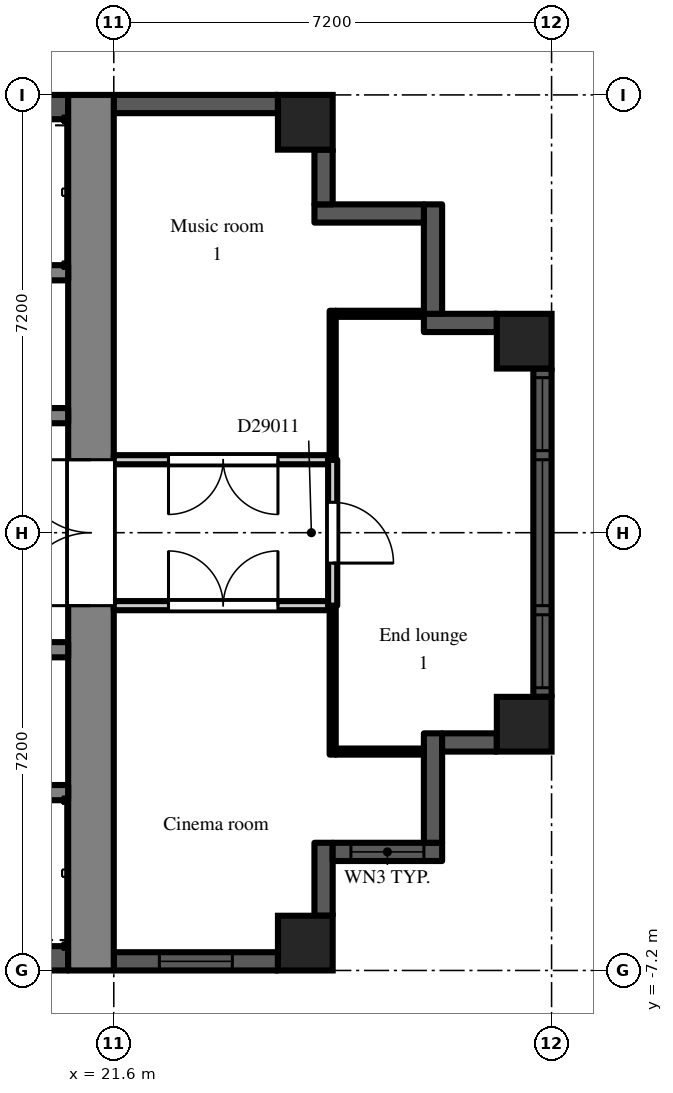
"""IFC4 building model, lengths in metres.
Left out: names, types, materials, properties, quantities, classifications, styles, units other than length and angle.
Written with IfcOpenShell. Run it as: python <this file> out.ifc"""

import sys

from ifc_helpers import new_model, si_unit, direction, frame, frame_2d, origin, origin_2d, place, context, subcontext, project, spatial, rectangle, extrude, element, fill, save


model = new_model("IFC4")
c1 = context("Model", 3, precision=1e-05, world=origin(), true_north=direction((0.0, 1.0)))
c2 = subcontext(c1, "Body", "Model", "MODEL_VIEW")
j1 = project(units=[si_unit("LENGTHUNIT", "METRE"), si_unit("PLANEANGLEUNIT", "RADIAN")], contexts=[c1])
p1 = place(None, origin())
s1 = spatial("IfcSite", under=j1, at=p1, CompositionType="ELEMENT")
p2 = place(p1, origin())
s2 = spatial("IfcBuilding", under=s1, at=p2, CompositionType="ELEMENT")
p3 = place(p2, frame((0.0, 0.0, 198.9)))
s3 = spatial("IfcBuildingStorey", under=s2, at=p3, CompositionType="ELEMENT", Elevation=198.9)
for number, where, z_axis, x_axis in (
    (1, (24.75, -6.75, 0.0), (0.0, 0.0, 1.0), (1.0, 0.0, 0.0)),
    (2, (24.75, 6.75, 0.0), (0.0, 0.0, 1.0), (1.0, 0.0, 0.0)),
    (3, (28.35, -3.15, 0.0), (0.0, 0.0, 1.0), (1.0, 0.0, 0.0)),
    (4, (28.35, 3.15, 0.0), (0.0, 0.0, 1.0), (1.0, 0.0, 0.0)),
):
    element("IfcColumn", number, at=place(p3, frame(where, z_axis=z_axis, x_axis=x_axis)), inside=s3, PredefinedType="COLUMN", context=c2, shape_type="SweptSolid", body=[
        extrude(rectangle(XDim=0.9, YDim=0.9, at=origin_2d()), origin(), (0.0, 0.0, 1.0), 3.0),
    ])
p4 = place(p3, frame((21.6, -7.05, 0.0), z_axis=(0.0, 0.0, 1.0), x_axis=(1.0, 0.0, 0.0)))
e5 = element("IfcWall", 5, at=p4, inside=s3, PredefinedType="SOLIDWALL", context=c2, shape_type="SweptSolid", body=[
    extrude(rectangle(XDim=2.7, YDim=0.3, at=frame_2d((1.35, 0.0))), origin(), (0.0, 0.0, 1.0), 2.3),
])
p5 = place(p4, frame((0.75, 0.0, 0.2)))
e6 = element("IfcOpeningElement", 6, at=p5, cuts=e5, PredefinedType="OPENING", context=c2, shape_type="SweptSolid", body=[
    extrude(rectangle(XDim=1.2, YDim=1.85, at=frame_2d((0.6, 0.925))), frame((0.0, 0.16, 0.0), z_axis=(0.0, -1.0, 0.0), x_axis=(1.0, 0.0, 0.0)), (0.0, 0.0, 1.0), 0.32),
])
p6 = place(p3, frame((25.05, -6.3, 0.0), z_axis=(0.0, 0.0, 1.0), x_axis=(0.0, 1.0, 0.0)))
e7 = element("IfcWall", 7, at=p6, inside=s3, PredefinedType="SOLIDWALL", context=c2, shape_type="SweptSolid", body=[
    extrude(rectangle(XDim=1.2, YDim=0.3, at=frame_2d((0.6, 0.0))), origin(), (0.0, 0.0, 1.0), 2.6),
])
p7 = place(p3, frame((25.2, -5.25, 0.0), z_axis=(0.0, 0.0, 1.0), x_axis=(1.0, 0.0, 0.0)))
e8 = element("IfcWall", 8, at=p7, inside=s3, PredefinedType="SOLIDWALL", context=c2, shape_type="SweptSolid", body=[
    extrude(rectangle(XDim=1.8, YDim=0.3, at=frame_2d((0.9, 0.0))), origin(), (0.0, 0.0, 1.0), 2.6),
])
p8 = place(p7, frame((0.3, 0.0, 0.2)))
e9 = element("IfcOpeningElement", 9, at=p8, cuts=e8, PredefinedType="OPENING", context=c2, shape_type="SweptSolid", body=[
    extrude(rectangle(XDim=1.2, YDim=1.85, at=frame_2d((0.6, 0.925))), frame((0.0, 0.16, 0.0), z_axis=(0.0, -1.0, 0.0), x_axis=(1.0, 0.0, 0.0)), (0.0, 0.0, 1.0), 0.32),
])
p9 = place(p3, frame((26.85, -5.1, 0.0), z_axis=(0.0, 0.0, 1.0), x_axis=(0.0, 1.0, 0.0)))
e10 = element("IfcWall", 10, at=p9, inside=s3, PredefinedType="SOLIDWALL", context=c2, shape_type="SweptSolid", body=[
    extrude(rectangle(XDim=1.8, YDim=0.3, at=frame_2d((0.9, 0.0))), origin(), (0.0, 0.0, 1.0), 2.6),
])
p10 = place(p3, frame((27.0, -3.45, 0.0), z_axis=(0.0, 0.0, 1.0), x_axis=(1.0, 0.0, 0.0)))
e11 = element("IfcWall", 11, at=p10, inside=s3, PredefinedType="SOLIDWALL", context=c2, shape_type="SweptSolid", body=[
    extrude(rectangle(XDim=0.9, YDim=0.3, at=frame_2d((0.45, 0.0))), origin(), (0.0, 0.0, 1.0), 2.6),
])
p11 = place(p3, frame((28.65, -2.7, 0.0), z_axis=(0.0, 0.0, 1.0), x_axis=(0.0, 1.0, 0.0)))
e12 = element("IfcWall", 12, at=p11, inside=s3, PredefinedType="SOLIDWALL", context=c2, shape_type="SweptSolid", body=[
    extrude(rectangle(XDim=5.4, YDim=0.3, at=frame_2d((2.7, 0.0))), origin(), (0.0, 0.0, 1.0), 2.3),
])
p12 = place(p11, frame((1.5, 0.0, 0.2)))
e13 = element("IfcOpeningElement", 13, at=p12, cuts=e12, PredefinedType="OPENING", context=c2, shape_type="SweptSolid", body=[
    extrude(rectangle(XDim=2.4, YDim=1.85, at=frame_2d((1.2, 0.925))), frame((0.0, 0.16, 0.0), z_axis=(0.0, -1.0, 0.0), x_axis=(1.0, 0.0, 0.0)), (0.0, 0.0, 1.0), 0.32),
])
p13 = place(p11, frame((0.15, 0.0, 0.2)))
e14 = element("IfcOpeningElement", 14, at=p13, cuts=e12, PredefinedType="OPENING", context=c2, shape_type="SweptSolid", body=[
    extrude(rectangle(XDim=1.2, YDim=1.85, at=frame_2d((0.6, 0.925))), frame((0.0, 0.16, 0.0), z_axis=(0.0, -1.0, 0.0), x_axis=(1.0, 0.0, 0.0)), (0.0, 0.0, 1.0), 0.32),
])
p14 = place(p11, frame((4.05, 0.0, 0.2)))
e15 = element("IfcOpeningElement", 15, at=p14, cuts=e12, PredefinedType="OPENING", context=c2, shape_type="SweptSolid", body=[
    extrude(rectangle(XDim=1.2, YDim=1.85, at=frame_2d((0.6, 0.925))), frame((0.0, 0.16, 0.0), z_axis=(0.0, -1.0, 0.0), x_axis=(1.0, 0.0, 0.0)), (0.0, 0.0, 1.0), 0.32),
])
p15 = place(p3, frame((27.9, 3.45, 0.0), z_axis=(0.0, 0.0, 1.0), x_axis=(-1.0, 0.0, 0.0)))
e16 = element("IfcWall", 16, at=p15, inside=s3, PredefinedType="SOLIDWALL", context=c2, shape_type="SweptSolid", body=[
    extrude(rectangle(XDim=1.2, YDim=0.3, at=frame_2d((0.6, 0.0))), origin(), (0.0, 0.0, 1.0), 2.6),
])
p16 = place(p3, frame((26.85, 3.6, 0.0), z_axis=(0.0, 0.0, 1.0), x_axis=(0.0, 1.0, 0.0)))
e17 = element("IfcWall", 17, at=p16, inside=s3, PredefinedType="SOLIDWALL", context=c2, shape_type="SweptSolid", body=[
    extrude(rectangle(XDim=1.8, YDim=0.3, at=frame_2d((0.9, 0.0))), origin(), (0.0, 0.0, 1.0), 2.6),
])
p17 = place(p3, frame((26.7, 5.25, 0.0), z_axis=(0.0, 0.0, 1.0), x_axis=(-1.0, 0.0, 0.0)))
e18 = element("IfcWall", 18, at=p17, inside=s3, PredefinedType="SOLIDWALL", context=c2, shape_type="SweptSolid", body=[
    extrude(rectangle(XDim=1.8, YDim=0.3, at=frame_2d((0.9, 0.0))), origin(), (0.0, 0.0, 1.0), 2.6),
])
p18 = place(p3, frame((25.05, 5.4, 0.0), z_axis=(0.0, 0.0, 1.0), x_axis=(0.0, 1.0, 0.0)))
e19 = element("IfcWall", 19, at=p18, inside=s3, PredefinedType="SOLIDWALL", context=c2, shape_type="SweptSolid", body=[
    extrude(rectangle(XDim=0.9, YDim=0.3, at=frame_2d((0.45, 0.0))), origin(), (0.0, 0.0, 1.0), 2.6),
])
p19 = place(p3, frame((24.3, 7.05, 0.0), z_axis=(0.0, 0.0, 1.0), x_axis=(-1.0, 0.0, 0.0)))
e20 = element("IfcWall", 20, at=p19, inside=s3, PredefinedType="SOLIDWALL", context=c2, shape_type="SweptSolid", body=[
    extrude(rectangle(XDim=2.7, YDim=0.3, at=frame_2d((1.35, 0.0))), origin(), (0.0, 0.0, 1.0), 2.3),
])
p20 = place(p3, frame((21.225, -7.2, 0.0), z_axis=(0.0, 0.0, 1.0), x_axis=(0.0, 1.0, 0.0)))
e21 = element("IfcWall", 21, at=p20, inside=s3, PredefinedType="SHEAR", context=c2, shape_type="SweptSolid", body=[
    extrude(rectangle(XDim=14.4, YDim=0.75, at=frame_2d((7.2, 0.0))), origin(), (0.0, 0.0, 1.0), 2.6),
])
p21 = place(p20, frame((6.0, 0.0, 0.0)))
e22 = element("IfcOpeningElement", 22, at=p21, cuts=e21, PredefinedType="OPENING", context=c2, shape_type="SweptSolid", body=[
    extrude(rectangle(XDim=2.4, YDim=2.2, at=frame_2d((1.2, 1.1))), frame((0.0, 0.385, 0.0), z_axis=(0.0, -1.0, 0.0), x_axis=(1.0, 0.0, 0.0)), (0.0, 0.0, 1.0), 0.77),
])
p22 = place(p3, frame((7.9, 7.0, 0.0), z_axis=(0.0, 0.0, 1.0), x_axis=(1.0, 0.0, 0.0)))
e23 = element("IfcWall", 23, at=p22, inside=s3, PredefinedType="SHEAR", context=c2, shape_type="SweptSolid", body=[
    extrude(rectangle(XDim=12.95, YDim=0.4, at=frame_2d((6.475, 0.0))), origin(), (0.0, 0.0, 1.0), 2.6),
])
p23 = place(p3, frame((7.9, 1.925, 0.0), z_axis=(0.0, 0.0, 1.0), x_axis=(1.0, 0.0, 0.0)))
e24 = element("IfcWall", 24, at=p23, inside=s3, PredefinedType="SHEAR", context=c2, shape_type="SweptSolid", body=[
    extrude(rectangle(XDim=12.95, YDim=0.25, at=frame_2d((6.475, 0.0))), origin(), (0.0, 0.0, 1.0), 2.6),
])
p24 = place(p23, frame((4.825, 0.0, 0.0)))
e25 = element("IfcOpeningElement", 25, at=p24, cuts=e24, PredefinedType="OPENING", context=c2, shape_type="SweptSolid", body=[
    extrude(rectangle(XDim=1.1, YDim=2.1, at=frame_2d((0.55, 1.05))), frame((0.0, 0.135, 0.0), z_axis=(0.0, -1.0, 0.0), x_axis=(1.0, 0.0, 0.0)), (0.0, 0.0, 1.0), 0.27),
])
p25 = place(p23, frame((7.025, 0.0, 0.0)))
e26 = element("IfcOpeningElement", 26, at=p25, cuts=e24, PredefinedType="OPENING", context=c2, shape_type="SweptSolid", body=[
    extrude(rectangle(XDim=1.1, YDim=2.1, at=frame_2d((0.55, 1.05))), frame((0.0, 0.135, 0.0), z_axis=(0.0, -1.0, 0.0), x_axis=(1.0, 0.0, 0.0)), (0.0, 0.0, 1.0), 0.27),
])
p26 = place(p23, frame((9.225, 0.0, 0.0)))
e27 = element("IfcOpeningElement", 27, at=p26, cuts=e24, PredefinedType="OPENING", context=c2, shape_type="SweptSolid", body=[
    extrude(rectangle(XDim=1.1, YDim=2.1, at=frame_2d((0.55, 1.05))), frame((0.0, 0.135, 0.0), z_axis=(0.0, -1.0, 0.0), x_axis=(1.0, 0.0, 0.0)), (0.0, 0.0, 1.0), 0.27),
])
p27 = place(p23, frame((0.525, 0.0, 0.0)))
e28 = element("IfcOpeningElement", 28, at=p27, cuts=e24, PredefinedType="OPENING", context=c2, shape_type="SweptSolid", body=[
    extrude(rectangle(XDim=0.9, YDim=2.1, at=frame_2d((0.45, 1.05))), frame((0.0, 0.135, 0.0), z_axis=(0.0, -1.0, 0.0), x_axis=(1.0, 0.0, 0.0)), (0.0, 0.0, 1.0), 0.27),
])
p28 = place(p23, frame((2.625, 0.0, 0.0)))
e29 = element("IfcOpeningElement", 29, at=p28, cuts=e24, PredefinedType="OPENING", context=c2, shape_type="SweptSolid", body=[
    extrude(rectangle(XDim=1.1, YDim=2.1, at=frame_2d((0.55, 1.05))), frame((0.0, 0.135, 0.0), z_axis=(0.0, -1.0, 0.0), x_axis=(1.0, 0.0, 0.0)), (0.0, 0.0, 1.0), 0.27),
])
p29 = place(p23, frame((11.525, 0.0, 0.0)))
e30 = element("IfcOpeningElement", 30, at=p29, cuts=e24, PredefinedType="OPENING", context=c2, shape_type="SweptSolid", body=[
    extrude(rectangle(XDim=0.9, YDim=2.1, at=frame_2d((0.45, 1.05))), frame((0.0, 0.135, 0.0), z_axis=(0.0, -1.0, 0.0), x_axis=(1.0, 0.0, 0.0)), (0.0, 0.0, 1.0), 0.27),
])
p30 = place(p3, frame((12.3, 4.275, 0.0), z_axis=(0.0, 0.0, 1.0), x_axis=(1.0, 0.0, 0.0)))
e31 = element("IfcWall", 31, at=p30, inside=s3, PredefinedType="SHEAR", context=c2, shape_type="SweptSolid", body=[
    extrude(rectangle(XDim=8.55, YDim=0.25, at=frame_2d((4.275, 0.0))), origin(), (0.0, 0.0, 1.0), 2.6),
])
p31 = place(p3, frame((7.9, -7.0, 0.0), z_axis=(0.0, 0.0, 1.0), x_axis=(1.0, 0.0, 0.0)))
e32 = element("IfcWall", 32, at=p31, inside=s3, PredefinedType="SHEAR", context=c2, shape_type="SweptSolid", body=[
    extrude(rectangle(XDim=12.95, YDim=0.4, at=frame_2d((6.475, 0.0))), origin(), (0.0, 0.0, 1.0), 2.6),
])
p32 = place(p3, frame((7.9, -1.925, 0.0), z_axis=(0.0, 0.0, 1.0), x_axis=(1.0, 0.0, 0.0)))
e33 = element("IfcWall", 33, at=p32, inside=s3, PredefinedType="SHEAR", context=c2, shape_type="SweptSolid", body=[
    extrude(rectangle(XDim=12.95, YDim=0.25, at=frame_2d((6.475, 0.0))), origin(), (0.0, 0.0, 1.0), 2.6),
])
p33 = place(p32, frame((0.525, 0.0, 0.0)))
e34 = element("IfcOpeningElement", 34, at=p33, cuts=e33, PredefinedType="OPENING", context=c2, shape_type="SweptSolid", body=[
    extrude(rectangle(XDim=0.9, YDim=2.1, at=frame_2d((0.45, 1.05))), frame((0.0, 0.135, 0.0), z_axis=(0.0, -1.0, 0.0), x_axis=(1.0, 0.0, 0.0)), (0.0, 0.0, 1.0), 0.27),
])
p34 = place(p32, frame((2.625, 0.0, 0.0)))
e35 = element("IfcOpeningElement", 35, at=p34, cuts=e33, PredefinedType="OPENING", context=c2, shape_type="SweptSolid", body=[
    extrude(rectangle(XDim=1.1, YDim=2.1, at=frame_2d((0.55, 1.05))), frame((0.0, 0.135, 0.0), z_axis=(0.0, -1.0, 0.0), x_axis=(1.0, 0.0, 0.0)), (0.0, 0.0, 1.0), 0.27),
])
p35 = place(p32, frame((6.025, 0.0, 0.0)))
e36 = element("IfcOpeningElement", 36, at=p35, cuts=e33, PredefinedType="OPENING", context=c2, shape_type="SweptSolid", body=[
    extrude(rectangle(XDim=0.9, YDim=2.1, at=frame_2d((0.45, 1.05))), frame((0.0, 0.135, 0.0), z_axis=(0.0, -1.0, 0.0), x_axis=(1.0, 0.0, 0.0)), (0.0, 0.0, 1.0), 0.27),
])
p36 = place(p32, frame((10.425, 0.0, 0.0)))
e37 = element("IfcOpeningElement", 37, at=p36, cuts=e33, PredefinedType="OPENING", context=c2, shape_type="SweptSolid", body=[
    extrude(rectangle(XDim=0.9, YDim=2.1, at=frame_2d((0.45, 1.05))), frame((0.0, 0.135, 0.0), z_axis=(0.0, -1.0, 0.0), x_axis=(1.0, 0.0, 0.0)), (0.0, 0.0, 1.0), 0.27),
])
p37 = place(p3, frame((12.3, -4.275, 0.0), z_axis=(0.0, 0.0, 1.0), x_axis=(1.0, 0.0, 0.0)))
e38 = element("IfcWall", 38, at=p37, inside=s3, PredefinedType="SHEAR", context=c2, shape_type="SweptSolid", body=[
    extrude(rectangle(XDim=8.55, YDim=0.25, at=frame_2d((4.275, 0.0))), origin(), (0.0, 0.0, 1.0), 2.6),
])
p38 = place(p3, frame((21.6, -1.2, 0.0), z_axis=(0.0, 0.0, 1.0), x_axis=(1.0, 0.0, 0.0)))
e39 = element("IfcWall", 39, at=p38, inside=s3, PredefinedType="PARTITIONING", context=c2, shape_type="SweptSolid", body=[
    extrude(rectangle(XDim=3.525, YDim=0.15, at=frame_2d((1.762, 0.0))), origin(), (0.0, 0.0, 1.0), 2.6),
])
p39 = place(p38, frame((0.9, 0.0, 0.0)))
e40 = element("IfcOpeningElement", 40, at=p39, cuts=e39, PredefinedType="OPENING", context=c2, shape_type="SweptSolid", body=[
    extrude(rectangle(XDim=1.8, YDim=2.1, at=frame_2d((0.9, 1.05))), frame((0.0, 0.085, 0.0), z_axis=(0.0, -1.0, 0.0), x_axis=(1.0, 0.0, 0.0)), (0.0, 0.0, 1.0), 0.17),
])
p40 = place(p3, frame((21.6, 1.2, 0.0), z_axis=(0.0, 0.0, 1.0), x_axis=(1.0, 0.0, 0.0)))
e41 = element("IfcWall", 41, at=p40, inside=s3, PredefinedType="PARTITIONING", context=c2, shape_type="SweptSolid", body=[
    extrude(rectangle(XDim=3.525, YDim=0.15, at=frame_2d((1.762, 0.0))), origin(), (0.0, 0.0, 1.0), 2.6),
])
p41 = place(p40, frame((0.9, 0.0, 0.0)))
e42 = element("IfcOpeningElement", 42, at=p41, cuts=e41, PredefinedType="OPENING", context=c2, shape_type="SweptSolid", body=[
    extrude(rectangle(XDim=1.8, YDim=2.1, at=frame_2d((0.9, 1.05))), frame((0.0, 0.085, 0.0), z_axis=(0.0, -1.0, 0.0), x_axis=(1.0, 0.0, 0.0)), (0.0, 0.0, 1.0), 0.17),
])
p42 = place(p3, frame((25.2, -3.65, 0.0), z_axis=(0.0, 0.0, 1.0), x_axis=(0.0, 1.0, 0.0)))
e43 = element("IfcWall", 43, at=p42, inside=s3, PredefinedType="PARTITIONING", context=c2, shape_type="SweptSolid", body=[
    extrude(rectangle(XDim=2.45, YDim=0.1, at=frame_2d((1.225, 0.0))), origin(), (0.0, 0.0, 1.0), 2.6),
])
p43 = place(p3, frame((25.25, -3.6, 0.0), z_axis=(0.0, 0.0, 1.0), x_axis=(1.0, 0.0, 0.0)))
e44 = element("IfcWall", 44, at=p43, inside=s3, PredefinedType="PARTITIONING", context=c2, shape_type="SweptSolid", body=[
    extrude(rectangle(XDim=1.45, YDim=0.1, at=frame_2d((0.725, 0.0))), origin(), (0.0, 0.0, 1.0), 2.6),
])
p44 = place(p3, frame((25.2, -1.2, 0.0), z_axis=(0.0, 0.0, 1.0), x_axis=(0.0, 1.0, 0.0)))
e45 = element("IfcWall", 45, at=p44, inside=s3, PredefinedType="PARTITIONING", context=c2, shape_type="SweptSolid", body=[
    extrude(rectangle(XDim=2.4, YDim=0.15, at=frame_2d((1.2, 0.0))), origin(), (0.0, 0.0, 1.0), 2.6),
])
p45 = place(p44, frame((0.7, 0.0, 0.0)))
e46 = element("IfcOpeningElement", 46, at=p45, cuts=e45, PredefinedType="OPENING", context=c2, shape_type="SweptSolid", body=[
    extrude(rectangle(XDim=1.0, YDim=2.1, at=frame_2d((0.5, 1.05))), frame((0.0, 0.085, 0.0), z_axis=(0.0, -1.0, 0.0), x_axis=(1.0, 0.0, 0.0)), (0.0, 0.0, 1.0), 0.17),
])
p46 = place(p3, frame((25.2, 1.2, 0.0), z_axis=(0.0, 0.0, 1.0), x_axis=(0.0, 1.0, 0.0)))
e47 = element("IfcWall", 47, at=p46, inside=s3, PredefinedType="PARTITIONING", context=c2, shape_type="SweptSolid", body=[
    extrude(rectangle(XDim=2.45, YDim=0.1, at=frame_2d((1.225, 0.0))), origin(), (0.0, 0.0, 1.0), 2.6),
])
p47 = place(p3, frame((25.25, 3.6, 0.0), z_axis=(0.0, 0.0, 1.0), x_axis=(1.0, 0.0, 0.0)))
e48 = element("IfcWall", 48, at=p47, inside=s3, PredefinedType="PARTITIONING", context=c2, shape_type="SweptSolid", body=[
    extrude(rectangle(XDim=1.45, YDim=0.1, at=frame_2d((0.725, 0.0))), origin(), (0.0, 0.0, 1.0), 2.6),
])
p48 = place(p5, origin())
e49 = element("IfcWindow", 49, at=p48, inside=s3, PartitioningType="SINGLE_PANEL", PredefinedType="WINDOW", context=c2, shape_type="SweptSolid", body=[
    extrude(rectangle(XDim=1.2, YDim=1.85, at=frame_2d((0.6, 0.925))), frame((0.0, 0.03, 0.0), z_axis=(0.0, -1.0, 0.0), x_axis=(1.0, 0.0, 0.0)), (0.0, 0.0, 1.0), 0.06),
])
fill(e6, e49)
p49 = place(p8, origin())
e50 = element("IfcWindow", 50, at=p49, inside=s3, PartitioningType="SINGLE_PANEL", PredefinedType="WINDOW", context=c2, shape_type="SweptSolid", body=[
    extrude(rectangle(XDim=1.2, YDim=1.85, at=frame_2d((0.6, 0.925))), frame((0.0, 0.03, 0.0), z_axis=(0.0, -1.0, 0.0), x_axis=(1.0, 0.0, 0.0)), (0.0, 0.0, 1.0), 0.06),
])
fill(e9, e50)
p50 = place(p12, origin())
e51 = element("IfcWindow", 51, at=p50, inside=s3, PartitioningType="SINGLE_PANEL", PredefinedType="WINDOW", context=c2, shape_type="SweptSolid", body=[
    extrude(rectangle(XDim=2.4, YDim=1.85, at=frame_2d((1.2, 0.925))), frame((0.0, 0.03, 0.0), z_axis=(0.0, -1.0, 0.0), x_axis=(1.0, 0.0, 0.0)), (0.0, 0.0, 1.0), 0.06),
])
fill(e13, e51)
p51 = place(p13, origin())
e52 = element("IfcWindow", 52, at=p51, inside=s3, PartitioningType="SINGLE_PANEL", PredefinedType="WINDOW", context=c2, shape_type="SweptSolid", body=[
    extrude(rectangle(XDim=1.2, YDim=1.85, at=frame_2d((0.6, 0.925))), frame((0.0, 0.03, 0.0), z_axis=(0.0, -1.0, 0.0), x_axis=(1.0, 0.0, 0.0)), (0.0, 0.0, 1.0), 0.06),
])
fill(e14, e52)
p52 = place(p14, origin())
e53 = element("IfcWindow", 53, at=p52, inside=s3, PartitioningType="SINGLE_PANEL", PredefinedType="WINDOW", context=c2, shape_type="SweptSolid", body=[
    extrude(rectangle(XDim=1.2, YDim=1.85, at=frame_2d((0.6, 0.925))), frame((0.0, 0.03, 0.0), z_axis=(0.0, -1.0, 0.0), x_axis=(1.0, 0.0, 0.0)), (0.0, 0.0, 1.0), 0.06),
])
fill(e15, e53)
p53 = place(p21, origin())
e54 = element("IfcDoor", 54, at=p53, inside=s3, OperationType="DOUBLE_DOOR_DOUBLE_SWING", PredefinedType="DOOR", context=c2, shape_type="SweptSolid", body=[
    extrude(rectangle(XDim=2.4, YDim=2.2, at=frame_2d((1.2, 1.1))), frame((0.0, 0.025, 0.0), z_axis=(0.0, -1.0, 0.0), x_axis=(1.0, 0.0, 0.0)), (0.0, 0.0, 1.0), 0.05),
])
fill(e22, e54)
p54 = place(p45, frame((1.0, 0.0, 0.0), z_axis=(0.0, 0.0, 1.0), x_axis=(-1.0, 0.0, 0.0)))
e55 = element("IfcDoor", 55, at=p54, inside=s3, OperationType="SINGLE_SWING_RIGHT", PredefinedType="DOOR", context=c2, shape_type="SweptSolid", body=[
    extrude(rectangle(XDim=1.0, YDim=2.1, at=frame_2d((0.5, 1.05))), frame((0.0, 0.025, 0.0), z_axis=(0.0, -1.0, 0.0), x_axis=(1.0, 0.0, 0.0)), (0.0, 0.0, 1.0), 0.05),
])
fill(e46, e55)
p55 = place(p41, frame((1.8, 0.0, 0.0), z_axis=(0.0, 0.0, 1.0), x_axis=(-1.0, 0.0, 0.0)))
e56 = element("IfcDoor", 56, at=p55, inside=s3, OperationType="DOUBLE_DOOR_DOUBLE_SWING", PredefinedType="DOOR", context=c2, shape_type="SweptSolid", body=[
    extrude(rectangle(XDim=1.8, YDim=2.1, at=frame_2d((0.9, 1.05))), frame((0.0, 0.025, 0.0), z_axis=(0.0, -1.0, 0.0), x_axis=(1.0, 0.0, 0.0)), (0.0, 0.0, 1.0), 0.05),
])
fill(e42, e56)
p56 = place(p39, origin())
e57 = element("IfcDoor", 57, at=p56, inside=s3, OperationType="DOUBLE_DOOR_DOUBLE_SWING", PredefinedType="DOOR", context=c2, shape_type="SweptSolid", body=[
    extrude(rectangle(XDim=1.8, YDim=2.1, at=frame_2d((0.9, 1.05))), frame((0.0, 0.025, 0.0), z_axis=(0.0, -1.0, 0.0), x_axis=(1.0, 0.0, 0.0)), (0.0, 0.0, 1.0), 0.05),
])
fill(e40, e57)
save(model, sys.argv[1])
